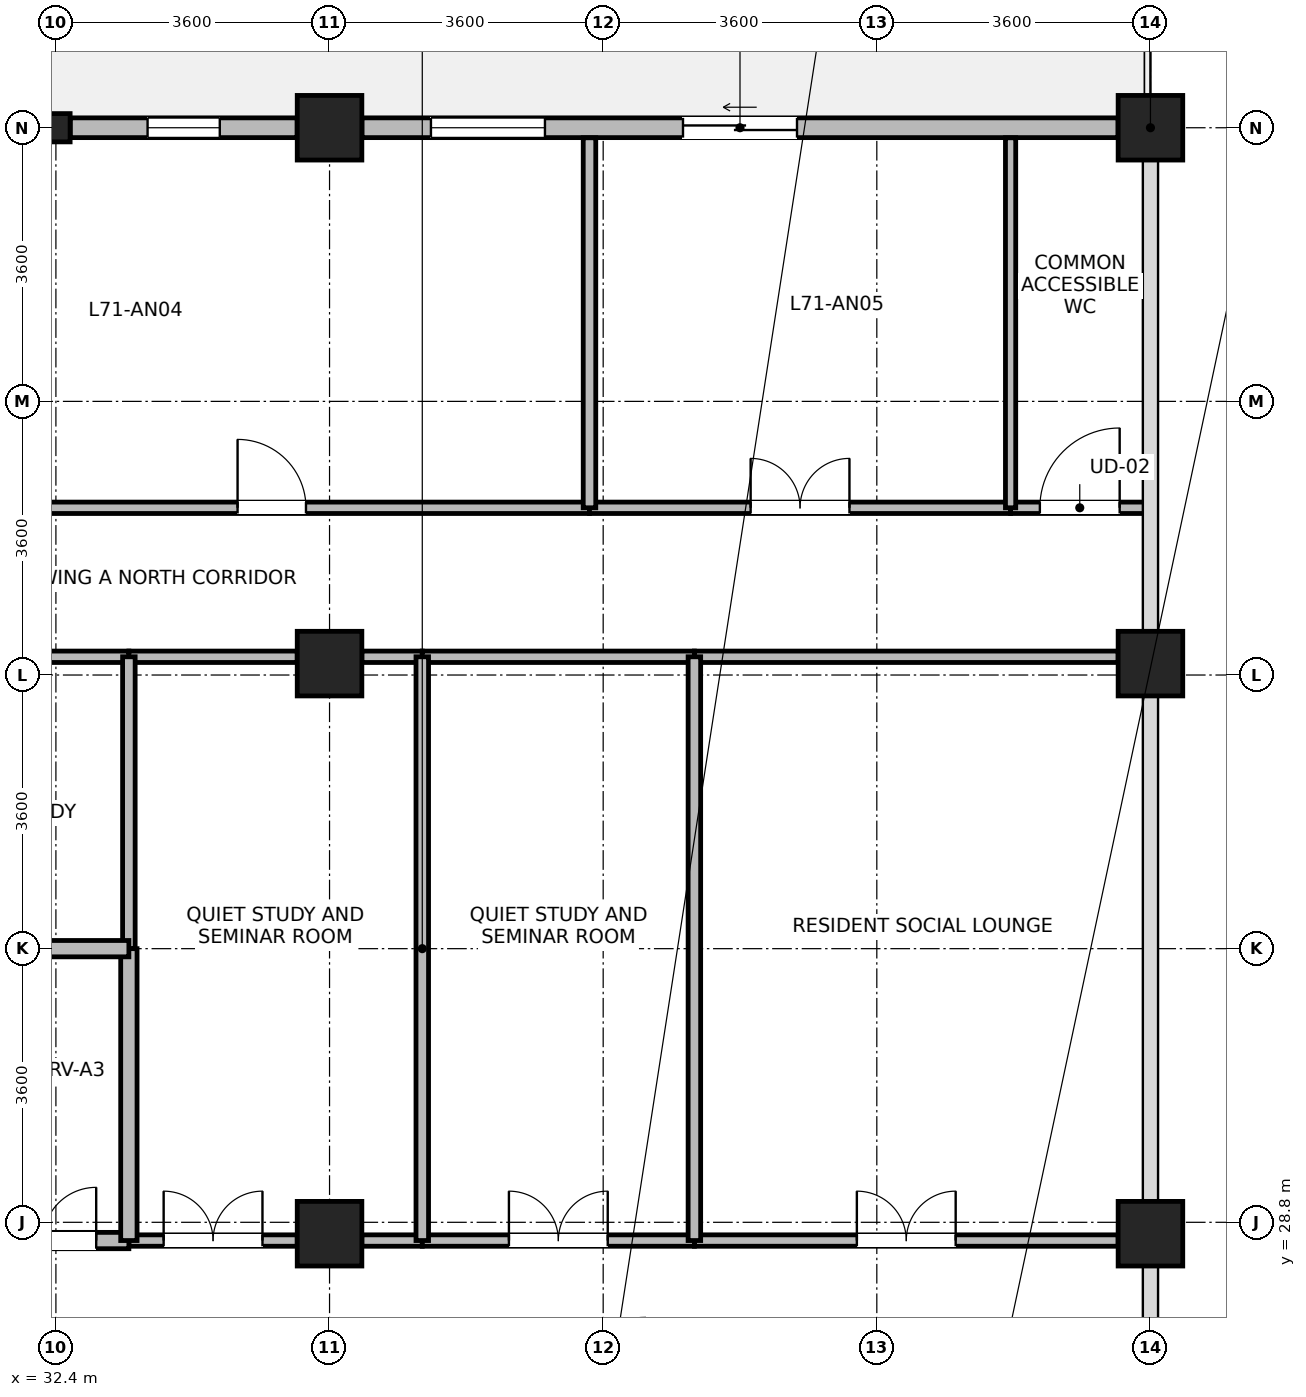
"""IFC4 building model, lengths in metres.
Left out: names, types, materials, properties, quantities, classifications, styles, units other than length and angle.
Written with IfcOpenShell. Run it as: python <this file> out.ifc"""

import sys

from ifc_helpers import new_model, si_unit, direction, frame, frame_2d, origin, origin_2d, place, context, subcontext, project, spatial, rectangle, i_section, extrude, source, transform, mapped, element, fill, save


model = new_model("IFC4")
c1 = context("Model", 3, precision=1e-05, world=origin(), true_north=direction((0.0, 1.0)))
c2 = subcontext(c1, "Body", "Model", "MODEL_VIEW")
j1 = project(units=[si_unit("LENGTHUNIT", "METRE"), si_unit("PLANEANGLEUNIT", "RADIAN")], contexts=[c1])
p1 = place(None, origin())
s1 = spatial("IfcSite", under=j1, at=p1, CompositionType="ELEMENT")
p2 = place(p1, origin())
s2 = spatial("IfcBuilding", under=s1, at=p2, CompositionType="ELEMENT")
p3 = place(p2, frame((0.0, 0.0, 275.8)))
s3 = spatial("IfcBuildingStorey", under=s2, at=p3, CompositionType="ELEMENT", Elevation=275.8)
m1 = source(origin(), c2, "Body", "SweptSolid", [
    extrude(rectangle(XDim=0.85, YDim=0.85, at=origin_2d()), origin(), (0.0, 0.0, 1.0), 3.7),
])
for number, where, z_axis, x_axis in (
    (1, (36.0, 43.2, 0.0), (0.0, 0.0, 1.0), (1.0, 0.0, 0.0)),
    (2, (36.0, 28.65, 0.0), (0.0, 0.0, 1.0), (1.0, 0.0, 0.0)),
    (3, (36.0, 36.15, 0.0), (0.0, 0.0, 1.0), (1.0, 0.0, 0.0)),
    (4, (46.8, 28.65, 0.0), (0.0, 0.0, 1.0), (1.0, 0.0, 0.0)),
    (5, (46.8, 36.15, 0.0), (0.0, 0.0, 1.0), (1.0, 0.0, 0.0)),
    (6, (46.8, 43.2, 0.0), (0.0, 0.0, 1.0), (1.0, 0.0, 0.0)),
):
    element("IfcColumn", number, at=place(p3, frame(where, z_axis=z_axis, x_axis=x_axis)), inside=s3, PredefinedType="COLUMN", context=c2, shape_type="MappedRepresentation", body=[
        mapped(m1, transform((0.0, 0.0, 0.0), x_axis=(1.0, 0.0, 0.0), y_axis=(0.0, 1.0, 0.0), z_axis=(0.0, 0.0, 1.0), scale=1.0)),
    ])
m2 = source(origin(), c2, "Body", "SweptSolid", [
    extrude(i_section(OverallWidth=0.374, OverallDepth=0.372, WebThickness=0.015, FlangeThickness=0.026, FilletRadius=0.015, at=origin_2d()), origin(), (0.0, 0.0, 1.0), 3.7),
])
p4 = place(p3, frame((32.4, 43.2, 0.0), z_axis=(0.0, 0.0, 1.0), x_axis=(1.0, 0.0, 0.0)))
e7 = element("IfcColumn", 7, at=p4, inside=s3, PredefinedType="COLUMN", context=c2, shape_type="MappedRepresentation", body=[
    mapped(m2, transform((0.0, 0.0, 0.0), x_axis=(1.0, 0.0, 0.0), y_axis=(0.0, 1.0, 0.0), z_axis=(0.0, 0.0, 1.0), scale=1.0)),
])
p5 = place(p3, frame((36.426, 43.2, 0.0), z_axis=(0.0, 0.0, 1.0), x_axis=(1.0, 0.0, 0.0)))
e8 = element("IfcWall", 8, at=p5, inside=s3, PredefinedType="STANDARD", context=c2, shape_type="SweptSolid", body=[
    extrude(rectangle(XDim=9.948, YDim=0.26, at=frame_2d((4.974, 0.0))), origin(), (0.0, 0.0, 1.0), 3.055),
])
p6 = place(p5, frame((4.224, 0.0, 0.0)))
e9 = element("IfcOpeningElement", 9, at=p6, cuts=e8, PredefinedType="OPENING", context=c2, shape_type="SweptSolid", body=[
    extrude(rectangle(XDim=1.5, YDim=2.15, at=frame_2d((0.75, 1.075))), frame((0.0, 0.14, 0.0), z_axis=(0.0, -1.0, 0.0), x_axis=(1.0, 0.0, 0.0)), (0.0, 0.0, 1.0), 0.28),
])
p7 = place(p5, frame((0.908, 0.0, 0.85)))
e10 = element("IfcOpeningElement", 10, at=p7, cuts=e8, PredefinedType="OPENING", context=c2, shape_type="SweptSolid", body=[
    extrude(rectangle(XDim=1.5, YDim=1.85, at=frame_2d((0.75, 0.925))), frame((0.0, 0.14, 0.0), z_axis=(0.0, -1.0, 0.0), x_axis=(1.0, 0.0, 0.0)), (0.0, 0.0, 1.0), 0.28),
])
p8 = place(p3, frame((32.588, 43.2, 0.0), z_axis=(0.0, 0.0, 1.0), x_axis=(1.0, 0.0, 0.0)))
e11 = element("IfcWall", 11, at=p8, inside=s3, PredefinedType="STANDARD", context=c2, shape_type="SweptSolid", body=[
    extrude(rectangle(XDim=2.986, YDim=0.26, at=frame_2d((1.493, 0.0))), origin(), (0.0, 0.0, 1.0), 3.055),
])
p9 = place(p8, frame((1.018, 0.0, 0.85)))
e12 = element("IfcOpeningElement", 12, at=p9, cuts=e11, PredefinedType="OPENING", context=c2, shape_type="SweptSolid", body=[
    extrude(rectangle(XDim=0.95, YDim=1.75, at=frame_2d((0.475, 0.875))), frame((0.0, 0.14, 0.0), z_axis=(0.0, -1.0, 0.0), x_axis=(1.0, 0.0, 0.0)), (0.0, 0.0, 1.0), 0.28),
])
p10 = place(p3, frame((31.06, 38.2, 0.0), z_axis=(0.0, 0.0, 1.0), x_axis=(1.0, 0.0, 0.0)))
e13 = element("IfcWall", 13, at=p10, inside=s3, PredefinedType="PARTITIONING", context=c2, shape_type="SweptSolid", body=[
    extrude(rectangle(XDim=8.36, YDim=0.15, at=frame_2d((4.18, 0.0))), origin(), (0.0, 0.0, 1.0), 3.455),
])
p11 = place(p10, frame((3.73, 0.0, 0.0)))
e14 = element("IfcOpeningElement", 14, at=p11, cuts=e13, PredefinedType="OPENING", context=c2, shape_type="SweptSolid", body=[
    extrude(rectangle(XDim=0.9, YDim=2.08, at=frame_2d((0.45, 1.04))), frame((0.0, 0.085, 0.0), z_axis=(0.0, -1.0, 0.0), x_axis=(1.0, 0.0, 0.0)), (0.0, 0.0, 1.0), 0.17),
])
p12 = place(p3, frame((40.8, 28.56, 0.0), z_axis=(0.0, 0.0, 1.0), x_axis=(1.0, 0.0, 0.0)))
e15 = element("IfcWall", 15, at=p12, inside=s3, PredefinedType="PARTITIONING", context=c2, shape_type="SweptSolid", body=[
    extrude(rectangle(XDim=5.575, YDim=0.15, at=frame_2d((2.788, 0.0))), origin(), (0.0, 0.0, 1.0), 2.905),
])
p13 = place(p12, frame((2.137, 0.0, 0.0)))
e16 = element("IfcOpeningElement", 16, at=p13, cuts=e15, PredefinedType="OPENING", context=c2, shape_type="SweptSolid", body=[
    extrude(rectangle(XDim=1.3, YDim=2.12, at=frame_2d((0.65, 1.06))), frame((0.0, 0.085, 0.0), z_axis=(0.0, -1.0, 0.0), x_axis=(1.0, 0.0, 0.0)), (0.0, 0.0, 1.0), 0.17),
])
p14 = place(p3, frame((40.8, 36.24, 0.0), z_axis=(0.0, 0.0, 1.0), x_axis=(1.0, 0.0, 0.0)))
e17 = element("IfcWall", 17, at=p14, inside=s3, PredefinedType="PARTITIONING", context=c2, shape_type="SweptSolid", body=[
    extrude(rectangle(XDim=5.575, YDim=0.15, at=frame_2d((2.788, 0.0))), origin(), (0.0, 0.0, 1.0), 2.905),
])
p15 = place(p3, frame((39.42, 38.2, 0.0), z_axis=(0.0, 0.0, 1.0), x_axis=(1.0, 0.0, 0.0)))
e18 = element("IfcWall", 18, at=p15, inside=s3, PredefinedType="PARTITIONING", context=c2, shape_type="SweptSolid", body=[
    extrude(rectangle(XDim=5.54, YDim=0.15, at=frame_2d((2.77, 0.0))), origin(), (0.0, 0.0, 1.0), 3.455),
])
p16 = place(p15, frame((2.12, 0.0, 0.0)))
e19 = element("IfcOpeningElement", 19, at=p16, cuts=e18, PredefinedType="OPENING", context=c2, shape_type="SweptSolid", body=[
    extrude(rectangle(XDim=1.3, YDim=2.12, at=frame_2d((0.65, 1.06))), frame((0.0, 0.085, 0.0), z_axis=(0.0, -1.0, 0.0), x_axis=(1.0, 0.0, 0.0)), (0.0, 0.0, 1.0), 0.17),
])
p17 = place(p3, frame((29.225, 36.24, 0.0), z_axis=(0.0, 0.0, 1.0), x_axis=(1.0, 0.0, 0.0)))
e20 = element("IfcWall", 20, at=p17, inside=s3, PredefinedType="PARTITIONING", context=c2, shape_type="SweptSolid", body=[
    extrude(rectangle(XDim=4.135, YDim=0.15, at=frame_2d((2.067, 0.0))), origin(), (0.0, 0.0, 1.0), 2.905),
])
p18 = place(p17, frame((1.417, 0.0, 0.0)))
e21 = element("IfcOpeningElement", 21, at=p18, cuts=e20, PredefinedType="OPENING", context=c2, shape_type="SweptSolid", body=[
    extrude(rectangle(XDim=1.3, YDim=2.12, at=frame_2d((0.65, 1.06))), frame((0.0, 0.085, 0.0), z_axis=(0.0, -1.0, 0.0), x_axis=(1.0, 0.0, 0.0)), (0.0, 0.0, 1.0), 0.17),
])
p19 = place(p3, frame((33.36, 28.56, 0.0), z_axis=(0.0, 0.0, 1.0), x_axis=(1.0, 0.0, 0.0)))
e22 = element("IfcWall", 22, at=p19, inside=s3, PredefinedType="PARTITIONING", context=c2, shape_type="SweptSolid", body=[
    extrude(rectangle(XDim=2.215, YDim=0.15, at=frame_2d((1.107, 0.0))), origin(), (0.0, 0.0, 1.0), 2.905),
])
p20 = place(p19, frame((0.458, 0.0, 0.0)))
e23 = element("IfcOpeningElement", 23, at=p20, cuts=e22, PredefinedType="OPENING", context=c2, shape_type="SweptSolid", body=[
    extrude(rectangle(XDim=1.3, YDim=2.12, at=frame_2d((0.65, 1.06))), frame((0.0, 0.085, 0.0), z_axis=(0.0, -1.0, 0.0), x_axis=(1.0, 0.0, 0.0)), (0.0, 0.0, 1.0), 0.17),
])
p21 = place(p3, frame((36.425, 28.56, 0.0), z_axis=(0.0, 0.0, 1.0), x_axis=(1.0, 0.0, 0.0)))
e24 = element("IfcWall", 24, at=p21, inside=s3, PredefinedType="PARTITIONING", context=c2, shape_type="SweptSolid", body=[
    extrude(rectangle(XDim=0.795, YDim=0.15, at=frame_2d((0.397, 0.0))), origin(), (0.0, 0.0, 1.0), 2.905),
])
p22 = place(p3, frame((33.36, 36.24, 0.0), z_axis=(0.0, 0.0, 1.0), x_axis=(1.0, 0.0, 0.0)))
e25 = element("IfcWall", 25, at=p22, inside=s3, PredefinedType="PARTITIONING", context=c2, shape_type="SweptSolid", body=[
    extrude(rectangle(XDim=2.215, YDim=0.15, at=frame_2d((1.107, 0.0))), origin(), (0.0, 0.0, 1.0), 2.905),
])
p23 = place(p3, frame((36.425, 36.24, 0.0), z_axis=(0.0, 0.0, 1.0), x_axis=(1.0, 0.0, 0.0)))
e26 = element("IfcWall", 26, at=p23, inside=s3, PredefinedType="PARTITIONING", context=c2, shape_type="SweptSolid", body=[
    extrude(rectangle(XDim=0.795, YDim=0.15, at=frame_2d((0.397, 0.0))), origin(), (0.0, 0.0, 1.0), 2.905),
])
p24 = place(p3, frame((37.22, 28.56, 0.0), z_axis=(0.0, 0.0, 1.0), x_axis=(1.0, 0.0, 0.0)))
e27 = element("IfcWall", 27, at=p24, inside=s3, PredefinedType="PARTITIONING", context=c2, shape_type="SweptSolid", body=[
    extrude(rectangle(XDim=3.58, YDim=0.15, at=frame_2d((1.79, 0.0))), origin(), (0.0, 0.0, 1.0), 2.905),
])
p25 = place(p24, frame((1.14, 0.0, 0.0)))
e28 = element("IfcOpeningElement", 28, at=p25, cuts=e27, PredefinedType="OPENING", context=c2, shape_type="SweptSolid", body=[
    extrude(rectangle(XDim=1.3, YDim=2.12, at=frame_2d((0.65, 1.06))), frame((0.0, 0.085, 0.0), z_axis=(0.0, -1.0, 0.0), x_axis=(1.0, 0.0, 0.0)), (0.0, 0.0, 1.0), 0.17),
])
p26 = place(p3, frame((37.22, 36.24, 0.0), z_axis=(0.0, 0.0, 1.0), x_axis=(1.0, 0.0, 0.0)))
e29 = element("IfcWall", 29, at=p26, inside=s3, PredefinedType="PARTITIONING", context=c2, shape_type="SweptSolid", body=[
    extrude(rectangle(XDim=3.58, YDim=0.15, at=frame_2d((1.79, 0.0))), origin(), (0.0, 0.0, 1.0), 2.905),
])
p27 = place(p3, frame((31.1, 28.56, 0.0), z_axis=(0.0, 0.0, 1.0), x_axis=(1.0, 0.0, 0.0)))
e30 = element("IfcWall", 30, at=p27, inside=s3, PredefinedType="PARTITIONING", context=c2, shape_type="SweptSolid", body=[
    extrude(rectangle(XDim=2.26, YDim=0.215, at=frame_2d((1.13, 0.0))), origin(), (0.0, 0.0, 1.0), 2.905),
])
p28 = place(p27, frame((0.43, 0.0, 0.0)))
e31 = element("IfcOpeningElement", 31, at=p28, cuts=e30, PredefinedType="OPENING", context=c2, shape_type="SweptSolid", body=[
    extrude(rectangle(XDim=1.4, YDim=2.15, at=frame_2d((0.7, 1.075))), frame((0.0, 0.118, 0.0), z_axis=(0.0, -1.0, 0.0), x_axis=(1.0, 0.0, 0.0)), (0.0, 0.0, 1.0), 0.235),
])
p29 = place(p3, frame((44.96, 38.2, 0.0), z_axis=(0.0, 0.0, 1.0), x_axis=(1.0, 0.0, 0.0)))
e32 = element("IfcWall", 32, at=p29, inside=s3, PredefinedType="PARTITIONING", context=c2, shape_type="SweptSolid", body=[
    extrude(rectangle(XDim=1.82, YDim=0.15, at=frame_2d((0.91, 0.0))), origin(), (0.0, 0.0, 1.0), 3.455),
])
p30 = place(p29, frame((0.385, 0.0, 0.0)))
e33 = element("IfcOpeningElement", 33, at=p30, cuts=e32, PredefinedType="OPENING", context=c2, shape_type="SweptSolid", body=[
    extrude(rectangle(XDim=1.05, YDim=2.12, at=frame_2d((0.525, 1.06))), frame((0.0, 0.085, 0.0), z_axis=(0.0, -1.0, 0.0), x_axis=(1.0, 0.0, 0.0)), (0.0, 0.0, 1.0), 0.17),
])
for number, where, z_axis, x_axis in (
    (34, (37.22, 28.56, 0.0), (0.0, 0.0, 1.0), (0.0, 1.0, 0.0)),
    (35, (40.8, 28.56, 0.0), (0.0, 0.0, 1.0), (0.0, 1.0, 0.0)),
):
    element("IfcWall", number, at=place(p3, frame(where, z_axis=z_axis, x_axis=x_axis)), inside=s3, PredefinedType="PARTITIONING", context=c2, shape_type="SweptSolid", body=[
        extrude(rectangle(XDim=7.68, YDim=0.165, at=frame_2d((3.84, 0.0))), origin(), (0.0, 0.0, 1.0), 3.455),
    ])
p31 = place(p3, frame((39.42, 38.2, 0.0), z_axis=(0.0, 0.0, 1.0), x_axis=(0.0, 1.0, 0.0)))
e36 = element("IfcWall", 36, at=p31, inside=s3, PredefinedType="PARTITIONING", context=c2, shape_type="SweptSolid", body=[
    extrude(rectangle(XDim=4.868, YDim=0.165, at=frame_2d((2.434, 0.0))), origin(), (0.0, 0.0, 1.0), 3.455),
])
p32 = place(p3, frame((44.96, 38.2, 0.0), z_axis=(0.0, 0.0, 1.0), x_axis=(0.0, 1.0, 0.0)))
e37 = element("IfcWall", 37, at=p32, inside=s3, PredefinedType="PARTITIONING", context=c2, shape_type="SweptSolid", body=[
    extrude(rectangle(XDim=4.868, YDim=0.135, at=frame_2d((2.434, 0.0))), origin(), (0.0, 0.0, 1.0), 3.455),
])
p33 = place(p3, frame((33.36, 32.4, 0.0), z_axis=(0.0, 0.0, 1.0), x_axis=(0.0, 1.0, 0.0)))
e38 = element("IfcWall", 38, at=p33, inside=s3, PredefinedType="PARTITIONING", context=c2, shape_type="SweptSolid", body=[
    extrude(rectangle(XDim=3.84, YDim=0.165, at=frame_2d((1.92, 0.0))), origin(), (0.0, 0.0, 1.0), 3.455),
])
p34 = place(p3, frame((33.36, 28.56, 0.0), z_axis=(0.0, 0.0, 1.0), x_axis=(0.0, 1.0, 0.0)))
e39 = element("IfcWall", 39, at=p34, inside=s3, PredefinedType="PARTITIONING", context=c2, shape_type="SweptSolid", body=[
    extrude(rectangle(XDim=3.84, YDim=0.215, at=frame_2d((1.92, 0.0))), origin(), (0.0, 0.0, 1.0), 3.455),
])
p35 = place(p3, frame((31.1, 32.4, 0.0), z_axis=(0.0, 0.0, 1.0), x_axis=(1.0, 0.0, 0.0)))
e40 = element("IfcWall", 40, at=p35, inside=s3, PredefinedType="PARTITIONING", context=c2, shape_type="SweptSolid", body=[
    extrude(rectangle(XDim=2.26, YDim=0.215, at=frame_2d((1.13, 0.0))), origin(), (0.0, 0.0, 1.0), 3.455),
])
p36 = place(p6, origin())
e41 = element("IfcDoor", 41, at=p36, inside=s3, OperationType="SLIDING_TO_LEFT", PredefinedType="DOOR", context=c2, shape_type="SweptSolid", body=[
    extrude(rectangle(XDim=1.5, YDim=2.15, at=frame_2d((0.75, 1.075))), frame((0.0, 0.025, 0.0), z_axis=(0.0, -1.0, 0.0), x_axis=(1.0, 0.0, 0.0)), (0.0, 0.0, 1.0), 0.05),
])
fill(e9, e41)
p37 = place(p7, origin())
e42 = element("IfcWindow", 42, at=p37, inside=s3, PartitioningType="SINGLE_PANEL", PredefinedType="WINDOW", context=c2, shape_type="SweptSolid", body=[
    extrude(rectangle(XDim=1.5, YDim=1.85, at=frame_2d((0.75, 0.925))), frame((0.0, 0.03, 0.0), z_axis=(0.0, -1.0, 0.0), x_axis=(1.0, 0.0, 0.0)), (0.0, 0.0, 1.0), 0.06),
])
fill(e10, e42)
p38 = place(p9, origin())
e43 = element("IfcWindow", 43, at=p38, inside=s3, PartitioningType="SINGLE_PANEL", PredefinedType="WINDOW", context=c2, shape_type="SweptSolid", body=[
    extrude(rectangle(XDim=0.95, YDim=1.75, at=frame_2d((0.475, 0.875))), frame((0.0, 0.03, 0.0), z_axis=(0.0, -1.0, 0.0), x_axis=(1.0, 0.0, 0.0)), (0.0, 0.0, 1.0), 0.06),
])
fill(e12, e43)
p39 = place(p11, origin())
e44 = element("IfcDoor", 44, at=p39, inside=s3, OperationType="SINGLE_SWING_LEFT", PredefinedType="DOOR", context=c2, shape_type="SweptSolid", body=[
    extrude(rectangle(XDim=0.9, YDim=2.08, at=frame_2d((0.45, 1.04))), frame((0.0, 0.025, 0.0), z_axis=(0.0, -1.0, 0.0), x_axis=(1.0, 0.0, 0.0)), (0.0, 0.0, 1.0), 0.05),
])
fill(e14, e44)
p40 = place(p13, origin())
e45 = element("IfcDoor", 45, at=p40, inside=s3, OperationType="DOUBLE_DOOR_SINGLE_SWING", PredefinedType="DOOR", context=c2, shape_type="SweptSolid", body=[
    extrude(rectangle(XDim=1.3, YDim=2.12, at=frame_2d((0.65, 1.06))), frame((0.0, 0.025, 0.0), z_axis=(0.0, -1.0, 0.0), x_axis=(1.0, 0.0, 0.0)), (0.0, 0.0, 1.0), 0.05),
])
fill(e16, e45)
p41 = place(p16, origin())
e46 = element("IfcDoor", 46, at=p41, inside=s3, OperationType="DOUBLE_DOOR_SINGLE_SWING", PredefinedType="DOOR", context=c2, shape_type="SweptSolid", body=[
    extrude(rectangle(XDim=1.3, YDim=2.12, at=frame_2d((0.65, 1.06))), frame((0.0, 0.025, 0.0), z_axis=(0.0, -1.0, 0.0), x_axis=(1.0, 0.0, 0.0)), (0.0, 0.0, 1.0), 0.05),
])
fill(e19, e46)
p42 = place(p20, origin())
e47 = element("IfcDoor", 47, at=p42, inside=s3, OperationType="DOUBLE_DOOR_SINGLE_SWING", PredefinedType="DOOR", context=c2, shape_type="SweptSolid", body=[
    extrude(rectangle(XDim=1.3, YDim=2.12, at=frame_2d((0.65, 1.06))), frame((0.0, 0.025, 0.0), z_axis=(0.0, -1.0, 0.0), x_axis=(1.0, 0.0, 0.0)), (0.0, 0.0, 1.0), 0.05),
])
fill(e23, e47)
p43 = place(p25, origin())
e48 = element("IfcDoor", 48, at=p43, inside=s3, OperationType="DOUBLE_DOOR_SINGLE_SWING", PredefinedType="DOOR", context=c2, shape_type="SweptSolid", body=[
    extrude(rectangle(XDim=1.3, YDim=2.12, at=frame_2d((0.65, 1.06))), frame((0.0, 0.025, 0.0), z_axis=(0.0, -1.0, 0.0), x_axis=(1.0, 0.0, 0.0)), (0.0, 0.0, 1.0), 0.05),
])
fill(e28, e48)
p44 = place(p28, origin())
e49 = element("IfcDoor", 49, at=p44, inside=s3, OperationType="DOUBLE_DOOR_SINGLE_SWING", PredefinedType="DOOR", context=c2, shape_type="SweptSolid", body=[
    extrude(rectangle(XDim=1.4, YDim=2.15, at=frame_2d((0.7, 1.075))), frame((0.0, 0.025, 0.0), z_axis=(0.0, -1.0, 0.0), x_axis=(1.0, 0.0, 0.0)), (0.0, 0.0, 1.0), 0.05),
])
fill(e31, e49)
p45 = place(p30, origin())
e50 = element("IfcDoor", 50, at=p45, inside=s3, OperationType="SINGLE_SWING_RIGHT", PredefinedType="DOOR", context=c2, shape_type="SweptSolid", body=[
    extrude(rectangle(XDim=1.05, YDim=2.12, at=frame_2d((0.525, 1.06))), frame((0.0, 0.025, 0.0), z_axis=(0.0, -1.0, 0.0), x_axis=(1.0, 0.0, 0.0)), (0.0, 0.0, 1.0), 0.05),
])
fill(e33, e50)
save(model, sys.argv[1])
